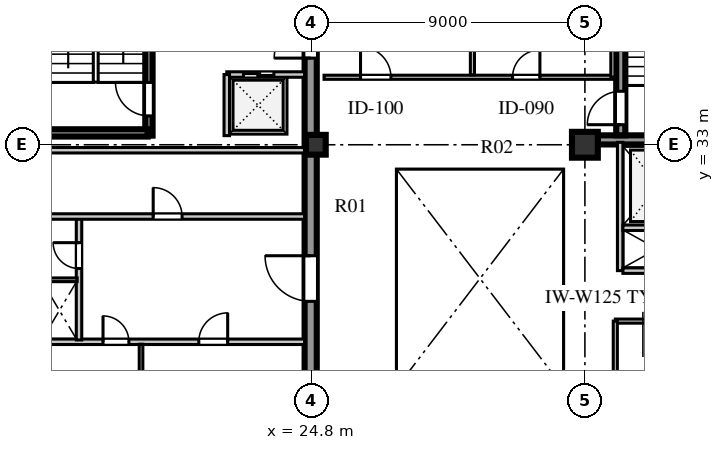
"""IFC4 building model, lengths in metres.
Left out: names, types, materials, properties, quantities, classifications, styles, units other than length and angle.
Written with IfcOpenShell. Run it as: python <this file> out.ifc"""

import sys

from ifc_helpers import new_model, si_unit, direction, frame, frame_2d, origin, origin_2d, place, context, subcontext, project, spatial, rectangle, extrude, element, fill, save


model = new_model("IFC4")
c1 = context("Model", 3, precision=1e-05, world=origin(), true_north=direction((0.0, 1.0)))
c2 = subcontext(c1, "Body", "Model", "MODEL_VIEW")
j1 = project(units=[si_unit("LENGTHUNIT", "METRE"), si_unit("PLANEANGLEUNIT", "RADIAN")], contexts=[c1])
p1 = place(None, origin())
s1 = spatial("IfcSite", under=j1, at=p1, CompositionType="ELEMENT")
p2 = place(p1, origin())
s2 = spatial("IfcBuilding", under=s1, at=p2, CompositionType="ELEMENT")
p3 = place(p2, frame((0.0, 0.0, 229.7)))
s3 = spatial("IfcBuildingStorey", under=s2, at=p3, CompositionType="ELEMENT", Elevation=229.7)
p4 = place(p3, frame((24.78, 15.74, 0.0), z_axis=(0.0, 0.0, 1.0), x_axis=(0.0, 1.0, 0.0)))
e1 = element("IfcWall", 1, at=p4, inside=s3, PredefinedType="SHEAR", context=c2, shape_type="SweptSolid", body=[
    extrude(rectangle(XDim=25.76, YDim=0.4, at=frame_2d((12.88, 0.0))), origin(), (0.0, 0.0, 1.0), 3.66),
])
p5 = place(p4, frame((1.61, 0.0, 0.0)))
e2 = element("IfcOpeningElement", 2, at=p5, cuts=e1, PredefinedType="OPENING", context=c2, shape_type="SweptSolid", body=[
    extrude(rectangle(XDim=1.2, YDim=2.1, at=frame_2d((0.6, 1.05))), frame((0.0, 0.21, 0.0), z_axis=(0.0, -1.0, 0.0), x_axis=(1.0, 0.0, 0.0)), (0.0, 0.0, 1.0), 0.42),
])
p6 = place(p4, frame((6.78, 0.0, 0.0)))
e3 = element("IfcOpeningElement", 3, at=p6, cuts=e1, PredefinedType="OPENING", context=c2, shape_type="SweptSolid", body=[
    extrude(rectangle(XDim=0.85, YDim=2.06, at=frame_2d((0.425, 1.03))), frame((0.0, 0.21, 0.0), z_axis=(0.0, -1.0, 0.0), x_axis=(1.0, 0.0, 0.0)), (0.0, 0.0, 1.0), 0.42),
])
p7 = place(p4, frame((12.11, 0.0, 0.0)))
e4 = element("IfcOpeningElement", 4, at=p7, cuts=e1, PredefinedType="OPENING", context=c2, shape_type="SweptSolid", body=[
    extrude(rectangle(XDim=1.5, YDim=2.12, at=frame_2d((0.75, 1.06))), frame((0.0, 0.21, 0.0), z_axis=(0.0, -1.0, 0.0), x_axis=(1.0, 0.0, 0.0)), (0.0, 0.0, 1.0), 0.42),
])
p8 = place(p4, frame((20.11, 0.0, 0.0)))
e5 = element("IfcOpeningElement", 5, at=p8, cuts=e1, PredefinedType="OPENING", context=c2, shape_type="SweptSolid", body=[
    extrude(rectangle(XDim=1.2, YDim=2.12, at=frame_2d((0.6, 1.06))), frame((0.0, 0.21, 0.0), z_axis=(0.0, -1.0, 0.0), x_axis=(1.0, 0.0, 0.0)), (0.0, 0.0, 1.0), 0.42),
])
p9 = place(p4, frame((24.01, 0.0, 0.0)))
e6 = element("IfcOpeningElement", 6, at=p9, cuts=e1, PredefinedType="OPENING", context=c2, shape_type="SweptSolid", body=[
    extrude(rectangle(XDim=0.95, YDim=2.1, at=frame_2d((0.475, 1.05))), frame((0.0, 0.21, 0.0), z_axis=(0.0, -1.0, 0.0), x_axis=(1.0, 0.0, 0.0)), (0.0, 0.0, 1.0), 0.42),
])
p10 = place(p3, frame((34.225, 33.16, 0.0), z_axis=(0.0, 0.0, 1.0), x_axis=(1.0, 0.0, 0.0)))
e7 = element("IfcWall", 7, at=p10, inside=s3, PredefinedType="SHEAR", context=c2, shape_type="SweptSolid", body=[
    extrude(rectangle(XDim=4.645, YDim=0.3, at=frame_2d((2.323, 0.0))), origin(), (0.0, 0.0, 1.0), 3.66),
])
p11 = place(p3, frame((34.98, 33.31, 0.0), z_axis=(0.0, 0.0, 1.0), x_axis=(0.0, 1.0, 0.0)))
e8 = element("IfcWall", 8, at=p11, inside=s3, PredefinedType="SHEAR", context=c2, shape_type="SweptSolid", body=[
    extrude(rectangle(XDim=8.03, YDim=0.3, at=frame_2d((4.015, 0.0))), origin(), (0.0, 0.0, 1.0), 3.66),
])
p12 = place(p11, frame((0.35, 0.0, 0.0)))
e9 = element("IfcOpeningElement", 9, at=p12, cuts=e8, PredefinedType="OPENING", context=c2, shape_type="SweptSolid", body=[
    extrude(rectangle(XDim=1.1, YDim=2.1, at=frame_2d((0.55, 1.05))), frame((0.0, 0.16, 0.0), z_axis=(0.0, -1.0, 0.0), x_axis=(1.0, 0.0, 0.0)), (0.0, 0.0, 1.0), 0.32),
])
p13 = place(p3, frame((24.95, 33.0, 0.0), z_axis=(0.0, 0.0, 1.0), x_axis=(1.0, 0.0, 0.0)))
e10 = element("IfcColumn", 10, at=p13, inside=s3, PredefinedType="COLUMN", context=c2, shape_type="SweptSolid", body=[
    extrude(rectangle(XDim=0.65, YDim=0.65, at=origin_2d()), origin(), (0.0, 0.0, 1.0), 3.66),
])
p14 = place(p3, frame((33.8, 33.0, 0.0), z_axis=(0.0, 0.0, 1.0), x_axis=(1.0, 0.0, 0.0)))
e11 = element("IfcColumn", 11, at=p14, inside=s3, PredefinedType="COLUMN", context=c2, shape_type="SweptSolid", body=[
    extrude(rectangle(XDim=0.85, YDim=0.85, at=origin_2d()), origin(), (0.0, 0.0, 1.0), 3.66),
])
p15 = place(p3, frame((15.9, 26.52, 0.0), z_axis=(0.0, 0.0, 1.0), x_axis=(1.0, 0.0, 0.0)))
e12 = element("IfcWall", 12, at=p15, inside=s3, PredefinedType="SOLIDWALL", context=c2, shape_type="SweptSolid", body=[
    extrude(rectangle(XDim=8.68, YDim=0.18, at=frame_2d((4.34, 0.0))), origin(), (0.0, 0.0, 1.0), 3.66),
])
p16 = place(p15, frame((2.05, 0.0, 0.0)))
e13 = element("IfcOpeningElement", 13, at=p16, cuts=e12, PredefinedType="OPENING", context=c2, shape_type="SweptSolid", body=[
    extrude(rectangle(XDim=0.85, YDim=2.06, at=frame_2d((0.425, 1.03))), frame((0.0, 0.1, 0.0), z_axis=(0.0, -1.0, 0.0), x_axis=(1.0, 0.0, 0.0)), (0.0, 0.0, 1.0), 0.2),
])
p17 = place(p15, frame((5.2, 0.0, 0.0)))
e14 = element("IfcOpeningElement", 14, at=p17, cuts=e12, PredefinedType="OPENING", context=c2, shape_type="SweptSolid", body=[
    extrude(rectangle(XDim=0.95, YDim=2.1, at=frame_2d((0.475, 1.05))), frame((0.0, 0.1, 0.0), z_axis=(0.0, -1.0, 0.0), x_axis=(1.0, 0.0, 0.0)), (0.0, 0.0, 1.0), 0.2),
])
p18 = place(p3, frame((19.2, 24.42, 0.0), z_axis=(0.0, 0.0, 1.0), x_axis=(0.0, 1.0, 0.0)))
e15 = element("IfcWall", 15, at=p18, inside=s3, PredefinedType="PARTITIONING", context=c2, shape_type="SweptSolid", body=[
    extrude(rectangle(XDim=2.02, YDim=0.12, at=frame_2d((1.01, 0.0))), origin(), (0.0, 0.0, 1.0), 3.66),
])
p19 = place(p3, frame((17.16, 26.58, 0.0), z_axis=(0.0, 0.0, 1.0), x_axis=(0.0, 1.0, 0.0)))
e16 = element("IfcWall", 16, at=p19, inside=s3, PredefinedType="SOLIDWALL", context=c2, shape_type="SweptSolid", body=[
    extrude(rectangle(XDim=4.02, YDim=0.18, at=frame_2d((2.01, 0.0))), origin(), (0.0, 0.0, 1.0), 3.66),
])
p20 = place(p19, frame((2.35, 0.0, 0.0)))
e17 = element("IfcOpeningElement", 17, at=p20, cuts=e16, PredefinedType="OPENING", context=c2, shape_type="SweptSolid", body=[
    extrude(rectangle(XDim=0.85, YDim=2.06, at=frame_2d((0.425, 1.03))), frame((0.0, 0.1, 0.0), z_axis=(0.0, -1.0, 0.0), x_axis=(1.0, 0.0, 0.0)), (0.0, 0.0, 1.0), 0.2),
])
p21 = place(p3, frame((15.9, 28.56, 0.0), z_axis=(0.0, 0.0, 1.0), x_axis=(1.0, 0.0, 0.0)))
e18 = element("IfcWall", 18, at=p21, inside=s3, PredefinedType="PARTITIONING", context=c2, shape_type="SweptSolid", body=[
    extrude(rectangle(XDim=1.2, YDim=0.12, at=frame_2d((0.6, 0.0))), origin(), (0.0, 0.0, 1.0), 3.66),
])
p22 = place(p3, frame((15.9, 30.64, 0.0), z_axis=(0.0, 0.0, 1.0), x_axis=(1.0, 0.0, 0.0)))
e19 = element("IfcWall", 19, at=p22, inside=s3, PredefinedType="SOLIDWALL", context=c2, shape_type="SweptSolid", body=[
    extrude(rectangle(XDim=8.68, YDim=0.18, at=frame_2d((4.34, 0.0))), origin(), (0.0, 0.0, 1.0), 3.66),
])
p23 = place(p22, frame((3.7, 0.0, 0.0)))
e20 = element("IfcOpeningElement", 20, at=p23, cuts=e19, PredefinedType="OPENING", context=c2, shape_type="SweptSolid", body=[
    extrude(rectangle(XDim=0.95, YDim=2.1, at=frame_2d((0.475, 1.05))), frame((0.0, 0.1, 0.0), z_axis=(0.0, -1.0, 0.0), x_axis=(1.0, 0.0, 0.0)), (0.0, 0.0, 1.0), 0.2),
])
p24 = place(p3, frame((15.9, 32.82, 0.0), z_axis=(0.0, 0.0, 1.0), x_axis=(1.0, 0.0, 0.0)))
e21 = element("IfcWall", 21, at=p24, inside=s3, PredefinedType="SOLIDWALL", context=c2, shape_type="SweptSolid", body=[
    extrude(rectangle(XDim=8.68, YDim=0.18, at=frame_2d((4.34, 0.0))), origin(), (0.0, 0.0, 1.0), 3.06),
])
p25 = place(p3, frame((19.46, 33.3, 0.0), z_axis=(0.0, 0.0, 1.0), x_axis=(0.0, 1.0, 0.0)))
e22 = element("IfcWall", 22, at=p25, inside=s3, PredefinedType="SHEAR", context=c2, shape_type="SweptSolid", body=[
    extrude(rectangle(XDim=8.18, YDim=0.24, at=frame_2d((4.09, 0.0))), origin(), (0.0, 0.0, 1.0), 3.9),
])
p26 = place(p25, frame((0.65, 0.0, 0.0)))
e23 = element("IfcOpeningElement", 23, at=p26, cuts=e22, PredefinedType="OPENING", context=c2, shape_type="SweptSolid", body=[
    extrude(rectangle(XDim=1.1, YDim=2.1, at=frame_2d((0.55, 1.05))), frame((0.0, 0.13, 0.0), z_axis=(0.0, -1.0, 0.0), x_axis=(1.0, 0.0, 0.0)), (0.0, 0.0, 1.0), 0.26),
])
p27 = place(p3, frame((15.9, 33.39, 0.0), z_axis=(0.0, 0.0, 1.0), x_axis=(1.0, 0.0, 0.0)))
e24 = element("IfcWall", 24, at=p27, inside=s3, PredefinedType="SHEAR", context=c2, shape_type="SweptSolid", body=[
    extrude(rectangle(XDim=3.52, YDim=0.24, at=frame_2d((1.76, 0.0))), origin(), (0.0, 0.0, 1.0), 3.9),
])
p28 = place(p3, frame((22.02, 35.31, 0.0), z_axis=(0.0, 0.0, 1.0), x_axis=(1.0, 0.0, 0.0)))
e25 = element("IfcWall", 25, at=p28, inside=s3, PredefinedType="SOLIDWALL", context=c2, shape_type="SweptSolid", body=[
    extrude(rectangle(XDim=2.56, YDim=0.18, at=frame_2d((1.28, 0.0))), origin(), (0.0, 0.0, 1.0), 3.66),
])
p29 = place(p28, frame((0.55, 0.0, 0.0)))
e26 = element("IfcOpeningElement", 26, at=p29, cuts=e25, PredefinedType="OPENING", context=c2, shape_type="SweptSolid", body=[
    extrude(rectangle(XDim=1.0, YDim=2.1, at=frame_2d((0.5, 1.05))), frame((0.0, 0.1, 0.0), z_axis=(0.0, -1.0, 0.0), x_axis=(1.0, 0.0, 0.0)), (0.0, 0.0, 1.0), 0.2),
])
p30 = place(p3, frame((22.02, 33.3, 0.0), z_axis=(0.0, 0.0, 1.0), x_axis=(0.0, 1.0, 0.0)))
e27 = element("IfcWall", 27, at=p30, inside=s3, PredefinedType="SOLIDWALL", context=c2, shape_type="SweptSolid", body=[
    extrude(rectangle(XDim=2.01, YDim=0.18, at=frame_2d((1.005, 0.0))), origin(), (0.0, 0.0, 1.0), 3.66),
])
p31 = place(p3, frame((34.96, 28.86, 0.0), z_axis=(0.0, 0.0, 1.0), x_axis=(0.0, 1.0, 0.0)))
e28 = element("IfcWall", 28, at=p31, inside=s3, PredefinedType="SOLIDWALL", context=c2, shape_type="SweptSolid", body=[
    extrude(rectangle(XDim=4.22, YDim=0.18, at=frame_2d((2.11, 0.0))), origin(), (0.0, 0.0, 1.0), 3.66),
])
for number, where, z_axis, x_axis in (
    (29, (35.05, 28.86, 0.0), (0.0, 0.0, 1.0), (1.0, 0.0, 0.0)),
    (30, (35.05, 30.27, 0.0), (0.0, 0.0, 1.0), (1.0, 0.0, 0.0)),
):
    element("IfcWall", number, at=place(p3, frame(where, z_axis=z_axis, x_axis=x_axis)), inside=s3, PredefinedType="SOLIDWALL", context=c2, shape_type="SweptSolid", body=[
        extrude(rectangle(XDim=2.25, YDim=0.18, at=frame_2d((1.125, 0.0))), origin(), (0.0, 0.0, 1.0), 3.66),
    ])
p32 = place(p3, frame((25.22, 35.22, 0.0), z_axis=(0.0, 0.0, 1.0), x_axis=(1.0, 0.0, 0.0)))
e31 = element("IfcWall", 31, at=p32, inside=s3, PredefinedType="PARTITIONING", context=c2, shape_type="SweptSolid", body=[
    extrude(rectangle(XDim=9.5, YDim=0.135, at=frame_2d((4.75, 0.0))), origin(), (0.0, 0.0, 1.0), 3.66),
])
p33 = place(p32, frame((1.2, 0.0, 0.0)))
e32 = element("IfcOpeningElement", 32, at=p33, cuts=e31, PredefinedType="OPENING", context=c2, shape_type="SweptSolid", body=[
    extrude(rectangle(XDim=1.0, YDim=2.08, at=frame_2d((0.5, 1.04))), frame((0.0, 0.078, 0.0), z_axis=(0.0, -1.0, 0.0), x_axis=(1.0, 0.0, 0.0)), (0.0, 0.0, 1.0), 0.155),
])
p34 = place(p32, frame((6.2, 0.0, 0.0)))
e33 = element("IfcOpeningElement", 33, at=p34, cuts=e31, PredefinedType="OPENING", context=c2, shape_type="SweptSolid", body=[
    extrude(rectangle(XDim=0.9, YDim=2.08, at=frame_2d((0.45, 1.04))), frame((0.0, 0.078, 0.0), z_axis=(0.0, -1.0, 0.0), x_axis=(1.0, 0.0, 0.0)), (0.0, 0.0, 1.0), 0.155),
])
p35 = place(p3, frame((34.72, 35.22, 0.0), z_axis=(0.0, 0.0, 1.0), x_axis=(0.0, 1.0, 0.0)))
e34 = element("IfcWall", 34, at=p35, inside=s3, PredefinedType="PARTITIONING", context=c2, shape_type="SweptSolid", body=[
    extrude(rectangle(XDim=14.1, YDim=0.135, at=frame_2d((7.05, 0.0))), origin(), (0.0, 0.0, 1.0), 3.66),
])
p36 = place(p3, frame((30.1, 35.3, 0.0), z_axis=(0.0, 0.0, 1.0), x_axis=(0.0, 1.0, 0.0)))
e35 = element("IfcWall", 35, at=p36, inside=s3, PredefinedType="PARTITIONING", context=c2, shape_type="SweptSolid", body=[
    extrude(rectangle(XDim=14.02, YDim=0.135, at=frame_2d((7.01, 0.0))), origin(), (0.0, 0.0, 1.0), 3.66),
])
p37 = place(p3, frame((34.8, 27.2, 0.0), z_axis=(0.0, 0.0, 1.0), x_axis=(1.0, 0.0, 0.0)))
e36 = element("IfcWall", 36, at=p37, inside=s3, PredefinedType="PARTITIONING", context=c2, shape_type="SweptSolid", body=[
    extrude(rectangle(XDim=5.9, YDim=0.135, at=frame_2d((2.95, 0.0))), origin(), (0.0, 0.0, 1.0), 3.31),
])
p38 = place(p3, frame((34.8, 23.42, 0.0), z_axis=(0.0, 0.0, 1.0), x_axis=(0.0, 1.0, 0.0)))
e37 = element("IfcWall", 37, at=p38, inside=s3, PredefinedType="PARTITIONING", context=c2, shape_type="SweptSolid", body=[
    extrude(rectangle(XDim=3.78, YDim=0.135, at=frame_2d((1.89, 0.0))), origin(), (0.0, 0.0, 1.0), 3.66),
])
p39 = place(p16, origin())
e38 = element("IfcDoor", 38, at=p39, inside=s3, OperationType="SINGLE_SWING_LEFT", PredefinedType="DOOR", context=c2, shape_type="SweptSolid", body=[
    extrude(rectangle(XDim=0.85, YDim=2.06, at=frame_2d((0.425, 1.03))), frame((0.0, 0.025, 0.0), z_axis=(0.0, -1.0, 0.0), x_axis=(1.0, 0.0, 0.0)), (0.0, 0.0, 1.0), 0.05),
])
fill(e13, e38)
p40 = place(p17, origin())
e39 = element("IfcDoor", 39, at=p40, inside=s3, OperationType="SINGLE_SWING_RIGHT", PredefinedType="DOOR", context=c2, shape_type="SweptSolid", body=[
    extrude(rectangle(XDim=0.95, YDim=2.1, at=frame_2d((0.475, 1.05))), frame((0.0, 0.025, 0.0), z_axis=(0.0, -1.0, 0.0), x_axis=(1.0, 0.0, 0.0)), (0.0, 0.0, 1.0), 0.05),
])
fill(e14, e39)
p41 = place(p20, origin())
e40 = element("IfcDoor", 40, at=p41, inside=s3, OperationType="SINGLE_SWING_RIGHT", PredefinedType="DOOR", context=c2, shape_type="SweptSolid", body=[
    extrude(rectangle(XDim=0.85, YDim=2.06, at=frame_2d((0.425, 1.03))), frame((0.0, 0.025, 0.0), z_axis=(0.0, -1.0, 0.0), x_axis=(1.0, 0.0, 0.0)), (0.0, 0.0, 1.0), 0.05),
])
fill(e17, e40)
p42 = place(p7, frame((1.5, 0.0, 0.0), z_axis=(0.0, 0.0, 1.0), x_axis=(-1.0, 0.0, 0.0)))
e41 = element("IfcDoor", 41, at=p42, inside=s3, OperationType="SINGLE_SWING_LEFT", PredefinedType="DOOR", context=c2, shape_type="SweptSolid", body=[
    extrude(rectangle(XDim=1.5, YDim=2.12, at=frame_2d((0.75, 1.06))), frame((0.0, 0.025, 0.0), z_axis=(0.0, -1.0, 0.0), x_axis=(1.0, 0.0, 0.0)), (0.0, 0.0, 1.0), 0.05),
])
fill(e4, e41)
p43 = place(p23, frame((0.95, 0.0, 0.0), z_axis=(0.0, 0.0, 1.0), x_axis=(-1.0, 0.0, 0.0)))
e42 = element("IfcDoor", 42, at=p43, inside=s3, OperationType="SINGLE_SWING_RIGHT", PredefinedType="DOOR", context=c2, shape_type="SweptSolid", body=[
    extrude(rectangle(XDim=0.95, YDim=2.1, at=frame_2d((0.475, 1.05))), frame((0.0, 0.025, 0.0), z_axis=(0.0, -1.0, 0.0), x_axis=(1.0, 0.0, 0.0)), (0.0, 0.0, 1.0), 0.05),
])
fill(e20, e42)
p44 = place(p26, origin())
e43 = element("IfcDoor", 43, at=p44, inside=s3, OperationType="SINGLE_SWING_RIGHT", PredefinedType="DOOR", context=c2, shape_type="SweptSolid", body=[
    extrude(rectangle(XDim=1.1, YDim=2.1, at=frame_2d((0.55, 1.05))), frame((0.0, 0.025, 0.0), z_axis=(0.0, -1.0, 0.0), x_axis=(1.0, 0.0, 0.0)), (0.0, 0.0, 1.0), 0.05),
])
fill(e23, e43)
p45 = place(p8, frame((1.2, 0.0, 0.0), z_axis=(0.0, 0.0, 1.0), x_axis=(-1.0, 0.0, 0.0)))
e44 = element("IfcDoor", 44, at=p45, inside=s3, OperationType="SINGLE_SWING_RIGHT", PredefinedType="DOOR", context=c2, shape_type="SweptSolid", body=[
    extrude(rectangle(XDim=1.2, YDim=2.12, at=frame_2d((0.6, 1.06))), frame((0.0, 0.025, 0.0), z_axis=(0.0, -1.0, 0.0), x_axis=(1.0, 0.0, 0.0)), (0.0, 0.0, 1.0), 0.05),
])
fill(e5, e44)
p46 = place(p29, origin())
e45 = element("IfcDoor", 45, at=p46, inside=s3, OperationType="DOUBLE_DOOR_SLIDING", PredefinedType="DOOR", context=c2, shape_type="SweptSolid", body=[
    extrude(rectangle(XDim=1.0, YDim=2.1, at=frame_2d((0.5, 1.05))), frame((0.0, 0.025, 0.0), z_axis=(0.0, -1.0, 0.0), x_axis=(1.0, 0.0, 0.0)), (0.0, 0.0, 1.0), 0.05),
])
fill(e26, e45)
p47 = place(p12, origin())
e46 = element("IfcDoor", 46, at=p47, inside=s3, OperationType="SINGLE_SWING_LEFT", PredefinedType="DOOR", context=c2, shape_type="SweptSolid", body=[
    extrude(rectangle(XDim=1.1, YDim=2.1, at=frame_2d((0.55, 1.05))), frame((0.0, 0.025, 0.0), z_axis=(0.0, -1.0, 0.0), x_axis=(1.0, 0.0, 0.0)), (0.0, 0.0, 1.0), 0.05),
])
fill(e9, e46)
p48 = place(p33, origin())
e47 = element("IfcDoor", 47, at=p48, inside=s3, OperationType="SINGLE_SWING_LEFT", PredefinedType="DOOR", context=c2, shape_type="SweptSolid", body=[
    extrude(rectangle(XDim=1.0, YDim=2.08, at=frame_2d((0.5, 1.04))), frame((0.0, 0.025, 0.0), z_axis=(0.0, -1.0, 0.0), x_axis=(1.0, 0.0, 0.0)), (0.0, 0.0, 1.0), 0.05),
])
fill(e32, e47)
p49 = place(p34, origin())
e48 = element("IfcDoor", 48, at=p49, inside=s3, OperationType="SINGLE_SWING_RIGHT", PredefinedType="DOOR", context=c2, shape_type="SweptSolid", body=[
    extrude(rectangle(XDim=0.9, YDim=2.08, at=frame_2d((0.45, 1.04))), frame((0.0, 0.025, 0.0), z_axis=(0.0, -1.0, 0.0), x_axis=(1.0, 0.0, 0.0)), (0.0, 0.0, 1.0), 0.05),
])
fill(e33, e48)
save(model, sys.argv[1])
